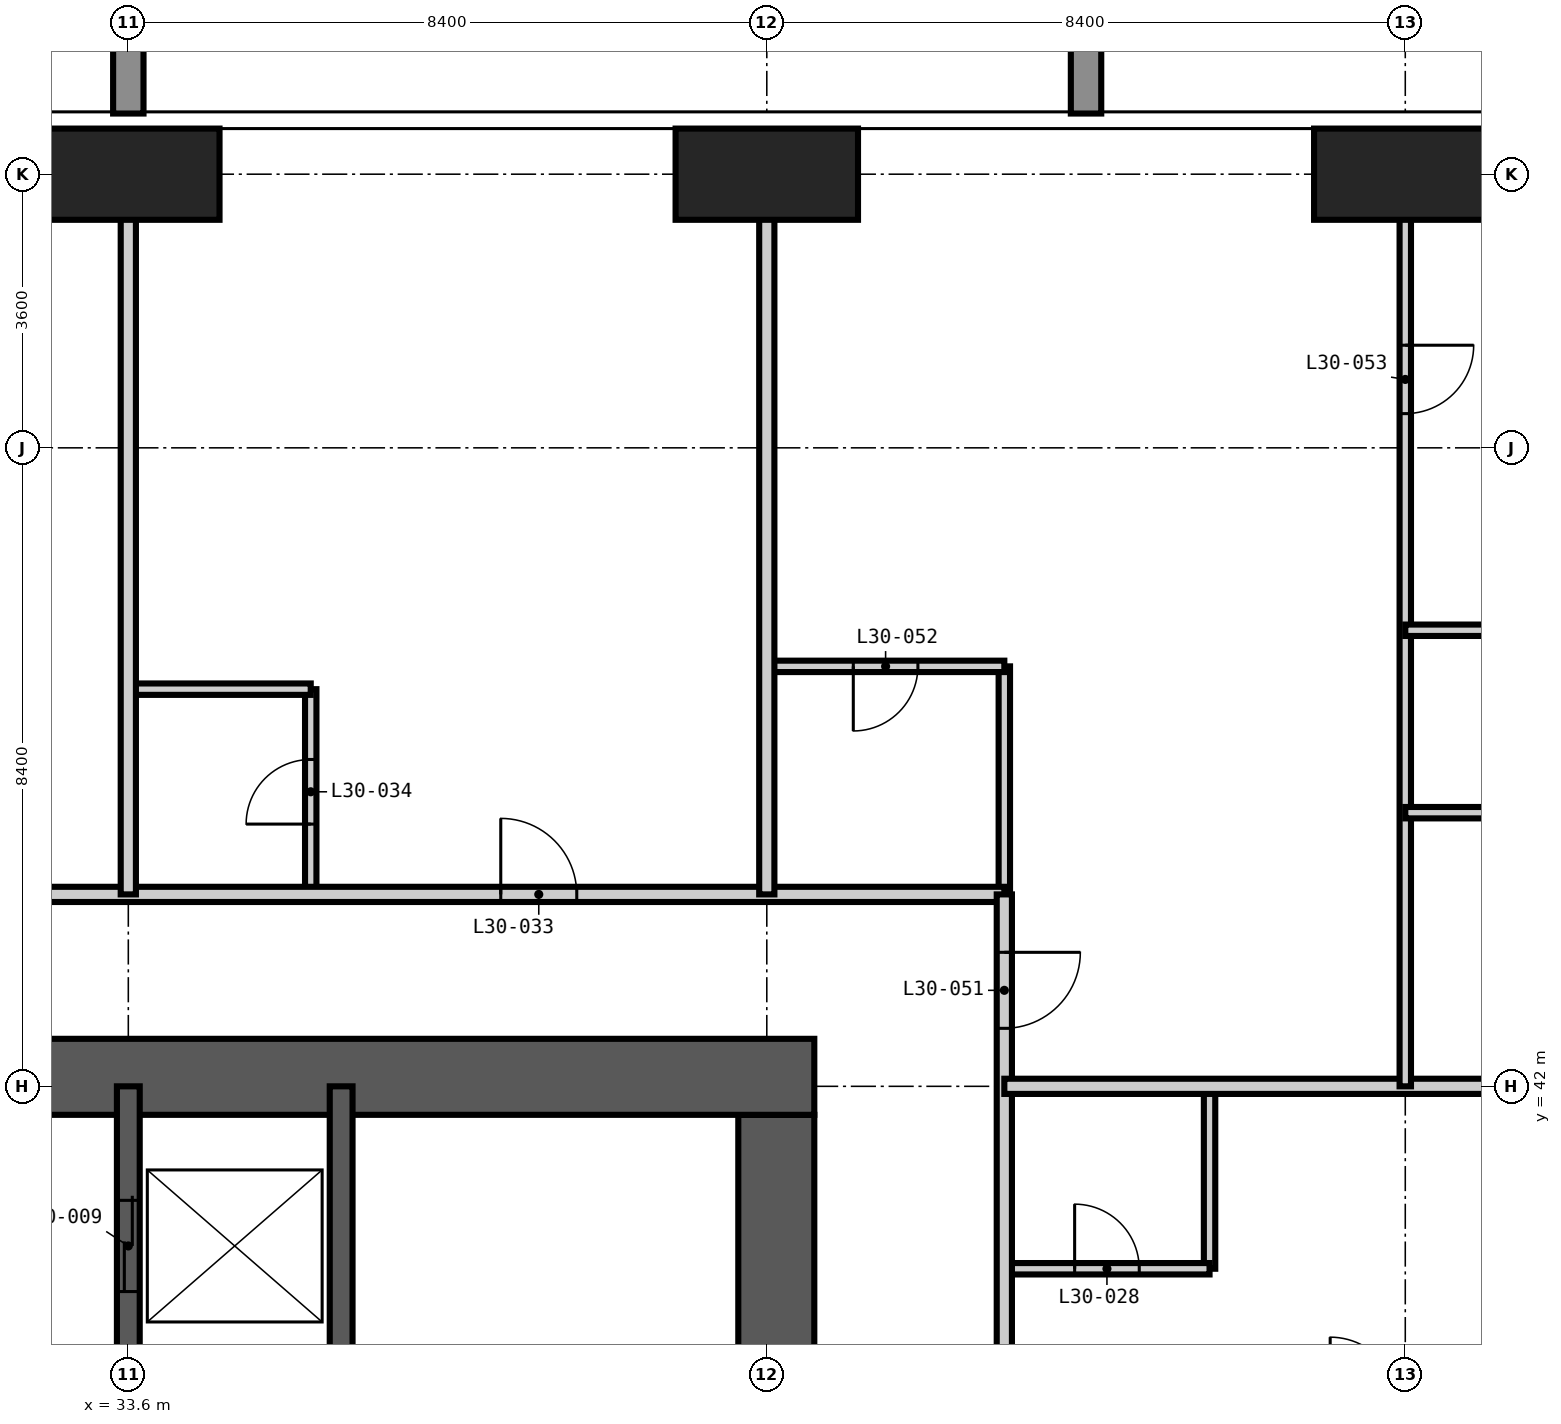
"""IFC4 building model, lengths in metres.
Left out: names, types, materials, properties, quantities, classifications, styles, units other than length and angle.
Written with IfcOpenShell. Run it as: python <this file> out.ifc"""

import sys

from ifc_helpers import new_model, si_unit, direction, frame, frame_2d, origin, origin_2d, place, context, subcontext, project, spatial, rectangle, extrude, element, fill, save


model = new_model("IFC4")
c1 = context("Model", 3, precision=1e-05, world=origin(), true_north=direction((0.0, 1.0)))
c2 = subcontext(c1, "Body", "Model", "MODEL_VIEW")
j1 = project(units=[si_unit("LENGTHUNIT", "METRE"), si_unit("PLANEANGLEUNIT", "RADIAN")], contexts=[c1])
p1 = place(None, origin())
s1 = spatial("IfcSite", under=j1, at=p1, CompositionType="ELEMENT")
p2 = place(p1, origin())
s2 = spatial("IfcBuilding", under=s1, at=p2, CompositionType="ELEMENT")
p3 = place(p2, frame((0.0, 0.0, 118.8)))
s3 = spatial("IfcBuildingStorey", under=s2, at=p3, CompositionType="ELEMENT", Elevation=118.8)
for number, where, z_axis, x_axis in (
    (1, (33.6, 54.0, -0.35), (0.0, 0.0, 1.0), (1.0, 0.0, 0.0)),
    (2, (42.0, 54.0, -0.35), (0.0, 0.0, 1.0), (1.0, 0.0, 0.0)),
    (3, (50.4, 54.0, -0.35), (0.0, 0.0, 1.0), (1.0, 0.0, 0.0)),
):
    element("IfcColumn", number, at=place(p3, frame(where, z_axis=z_axis, x_axis=x_axis)), inside=s3, PredefinedType="COLUMN", context=c2, shape_type="SweptSolid", body=[
        extrude(rectangle(XDim=2.4, YDim=1.2, at=origin_2d()), origin(), (0.0, 0.0, 1.0), 3.6),
    ])
p4 = place(p3, frame((42.125, 17.175, -0.35), z_axis=(0.0, 0.0, 1.0), x_axis=(0.0, 1.0, 0.0)))
e4 = element("IfcWall", 4, at=p4, inside=s3, PredefinedType="SHEAR", context=c2, shape_type="SweptSolid", body=[
    extrude(rectangle(XDim=24.45, YDim=1.0, at=frame_2d((12.225, 0.0))), origin(), (0.0, 0.0, 1.0), 3.6),
])
p5 = place(p4, frame((0.425, 0.0, 0.35)))
e5 = element("IfcOpeningElement", 5, at=p5, cuts=e4, PredefinedType="OPENING", context=c2, shape_type="SweptSolid", body=[
    extrude(rectangle(XDim=1.2, YDim=2.2, at=frame_2d((0.6, 1.1))), frame((0.0, 0.51, 0.0), z_axis=(0.0, -1.0, 0.0), x_axis=(1.0, 0.0, 0.0)), (0.0, 0.0, 1.0), 1.02),
])
p6 = place(p4, frame((11.325, 0.0, 0.35)))
e6 = element("IfcOpeningElement", 6, at=p6, cuts=e4, PredefinedType="OPENING", context=c2, shape_type="SweptSolid", body=[
    extrude(rectangle(XDim=1.8, YDim=2.2, at=frame_2d((0.9, 1.1))), frame((0.0, 0.51, 0.0), z_axis=(0.0, -1.0, 0.0), x_axis=(1.0, 0.0, 0.0)), (0.0, 0.0, 1.0), 1.02),
])
p7 = place(p4, frame((20.125, 0.0, 0.35)))
e7 = element("IfcOpeningElement", 7, at=p7, cuts=e4, PredefinedType="OPENING", context=c2, shape_type="SweptSolid", body=[
    extrude(rectangle(XDim=1.0, YDim=2.1, at=frame_2d((0.5, 1.05))), frame((0.0, 0.51, 0.0), z_axis=(0.0, -1.0, 0.0), x_axis=(1.0, 0.0, 0.0)), (0.0, 0.0, 1.0), 1.02),
])
p8 = place(p3, frame((42.625, 42.125, -0.35), z_axis=(0.0, 0.0, 1.0), x_axis=(-1.0, 0.0, 0.0)))
e8 = element("IfcWall", 8, at=p8, inside=s3, PredefinedType="SHEAR", context=c2, shape_type="SweptSolid", body=[
    extrude(rectangle(XDim=26.45, YDim=1.0, at=frame_2d((13.225, 0.0))), origin(), (0.0, 0.0, 1.0), 3.6),
])
p9 = place(p8, frame((21.125, 0.0, 0.35)))
e9 = element("IfcOpeningElement", 9, at=p9, cuts=e8, PredefinedType="OPENING", context=c2, shape_type="SweptSolid", body=[
    extrude(rectangle(XDim=1.0, YDim=2.1, at=frame_2d((0.5, 1.05))), frame((0.0, 0.51, 0.0), z_axis=(0.0, -1.0, 0.0), x_axis=(1.0, 0.0, 0.0)), (0.0, 0.0, 1.0), 1.02),
])
p10 = place(p8, frame((10.525, 0.0, 0.35)))
e10 = element("IfcOpeningElement", 10, at=p10, cuts=e8, PredefinedType="OPENING", context=c2, shape_type="SweptSolid", body=[
    extrude(rectangle(XDim=1.2, YDim=2.2, at=frame_2d((0.6, 1.1))), frame((0.0, 0.51, 0.0), z_axis=(0.0, -1.0, 0.0), x_axis=(1.0, 0.0, 0.0)), (0.0, 0.0, 1.0), 1.02),
])
p11 = place(p3, frame((33.6, 16.8, -0.35), z_axis=(0.0, 0.0, 1.0), x_axis=(0.0, 1.0, 0.0)))
e11 = element("IfcWall", 11, at=p11, inside=s3, PredefinedType="SHEAR", context=c2, shape_type="SweptSolid", body=[
    extrude(rectangle(XDim=25.2, YDim=0.3, at=frame_2d((12.6, 0.0))), origin(), (0.0, 0.0, 1.0), 3.6),
])
p12 = place(p11, frame((22.5, 0.0, 0.35)))
e12 = element("IfcOpeningElement", 12, at=p12, cuts=e11, PredefinedType="OPENING", context=c2, shape_type="SweptSolid", body=[
    extrude(rectangle(XDim=1.2, YDim=2.2, at=frame_2d((0.6, 1.1))), frame((0.0, 0.16, 0.0), z_axis=(0.0, -1.0, 0.0), x_axis=(1.0, 0.0, 0.0)), (0.0, 0.0, 1.0), 0.32),
])
p13 = place(p11, frame((18.3, 0.0, 0.35)))
e13 = element("IfcOpeningElement", 13, at=p13, cuts=e11, PredefinedType="OPENING", context=c2, shape_type="SweptSolid", body=[
    extrude(rectangle(XDim=1.2, YDim=2.2, at=frame_2d((0.6, 1.1))), frame((0.0, 0.16, 0.0), z_axis=(0.0, -1.0, 0.0), x_axis=(1.0, 0.0, 0.0)), (0.0, 0.0, 1.0), 0.32),
])
p14 = place(p3, frame((36.4, 33.6, -0.35), z_axis=(0.0, 0.0, 1.0), x_axis=(0.0, 1.0, 0.0)))
e14 = element("IfcWall", 14, at=p14, inside=s3, PredefinedType="SHEAR", context=c2, shape_type="SweptSolid", body=[
    extrude(rectangle(XDim=8.4, YDim=0.3, at=frame_2d((4.2, 0.0))), origin(), (0.0, 0.0, 1.0), 3.6),
])
p15 = place(p3, frame((36.0, 44.525, 0.0), z_axis=(0.0, 0.0, 1.0), x_axis=(0.0, 1.0, 0.0)))
e15 = element("IfcWall", 15, at=p15, inside=s3, PredefinedType="PARTITIONING", context=c2, shape_type="SweptSolid", body=[
    extrude(rectangle(XDim=2.7, YDim=0.15, at=frame_2d((1.35, 0.0))), origin(), (0.0, 0.0, 1.0), 3.25),
])
p16 = place(p15, frame((0.925, 0.0, 0.0)))
e16 = element("IfcOpeningElement", 16, at=p16, cuts=e15, PredefinedType="OPENING", context=c2, shape_type="SweptSolid", body=[
    extrude(rectangle(XDim=0.85, YDim=2.1, at=frame_2d((0.425, 1.05))), frame((0.0, 0.085, 0.0), z_axis=(0.0, -1.0, 0.0), x_axis=(1.0, 0.0, 0.0)), (0.0, 0.0, 1.0), 0.17),
])
p17 = place(p3, frame((45.125, 44.525, 0.0), z_axis=(0.0, 0.0, 1.0), x_axis=(0.0, 1.0, 0.0)))
e17 = element("IfcWall", 17, at=p17, inside=s3, PredefinedType="PARTITIONING", context=c2, shape_type="SweptSolid", body=[
    extrude(rectangle(XDim=3.0, YDim=0.15, at=frame_2d((1.5, 0.0))), origin(), (0.0, 0.0, 1.0), 3.25),
])
p18 = place(p3, frame((47.825, 39.6, 0.0), z_axis=(0.0, 0.0, 1.0), x_axis=(0.0, 1.0, 0.0)))
e18 = element("IfcWall", 18, at=p18, inside=s3, PredefinedType="PARTITIONING", context=c2, shape_type="SweptSolid", body=[
    extrude(rectangle(XDim=2.4, YDim=0.15, at=frame_2d((1.2, 0.0))), origin(), (0.0, 0.0, 1.0), 3.25),
])
p19 = place(p3, frame((45.125, 39.6, 0.0), z_axis=(0.0, 0.0, 1.0), x_axis=(1.0, 0.0, 0.0)))
e19 = element("IfcWall", 19, at=p19, inside=s3, PredefinedType="PARTITIONING", context=c2, shape_type="SweptSolid", body=[
    extrude(rectangle(XDim=2.7, YDim=0.15, at=frame_2d((1.35, 0.0))), origin(), (0.0, 0.0, 1.0), 3.25),
])
p20 = place(p19, frame((0.925, 0.0, 0.0)))
e20 = element("IfcOpeningElement", 20, at=p20, cuts=e19, PredefinedType="OPENING", context=c2, shape_type="SweptSolid", body=[
    extrude(rectangle(XDim=0.85, YDim=2.1, at=frame_2d((0.425, 1.05))), frame((0.0, 0.085, 0.0), z_axis=(0.0, -1.0, 0.0), x_axis=(1.0, 0.0, 0.0)), (0.0, 0.0, 1.0), 0.17),
])
p21 = place(p3, frame((33.6, 47.225, 0.0), z_axis=(0.0, 0.0, 1.0), x_axis=(1.0, 0.0, 0.0)))
e21 = element("IfcWall", 21, at=p21, inside=s3, PredefinedType="PARTITIONING", context=c2, shape_type="SweptSolid", body=[
    extrude(rectangle(XDim=2.4, YDim=0.15, at=frame_2d((1.2, 0.0))), origin(), (0.0, 0.0, 1.0), 3.25),
])
p22 = place(p3, frame((42.0, 47.525, 0.0), z_axis=(0.0, 0.0, 1.0), x_axis=(1.0, 0.0, 0.0)))
e22 = element("IfcWall", 22, at=p22, inside=s3, PredefinedType="PARTITIONING", context=c2, shape_type="SweptSolid", body=[
    extrude(rectangle(XDim=3.125, YDim=0.15, at=frame_2d((1.562, 0.0))), origin(), (0.0, 0.0, 1.0), 3.25),
])
p23 = place(p22, frame((1.138, 0.0, 0.0)))
e23 = element("IfcOpeningElement", 23, at=p23, cuts=e22, PredefinedType="OPENING", context=c2, shape_type="SweptSolid", body=[
    extrude(rectangle(XDim=0.85, YDim=2.1, at=frame_2d((0.425, 1.05))), frame((0.0, 0.085, 0.0), z_axis=(0.0, -1.0, 0.0), x_axis=(1.0, 0.0, 0.0)), (0.0, 0.0, 1.0), 0.17),
])
p24 = place(p3, frame((12.6, 44.525, 0.0), z_axis=(0.0, 0.0, 1.0), x_axis=(1.0, 0.0, 0.0)))
e24 = element("IfcWall", 24, at=p24, inside=s3, PredefinedType="PARTITIONING", context=c2, shape_type="SweptSolid", body=[
    extrude(rectangle(XDim=32.525, YDim=0.2, at=frame_2d((16.262, 0.0))), origin(), (0.0, 0.0, 1.0), 3.25),
])
p25 = place(p24, frame((9.1, 0.0, 0.0)))
e25 = element("IfcOpeningElement", 25, at=p25, cuts=e24, PredefinedType="OPENING", context=c2, shape_type="SweptSolid", body=[
    extrude(rectangle(XDim=1.0, YDim=2.2, at=frame_2d((0.5, 1.1))), frame((0.0, 0.11, 0.0), z_axis=(0.0, -1.0, 0.0), x_axis=(1.0, 0.0, 0.0)), (0.0, 0.0, 1.0), 0.22),
])
p26 = place(p24, frame((17.5, 0.0, 0.0)))
e26 = element("IfcOpeningElement", 26, at=p26, cuts=e24, PredefinedType="OPENING", context=c2, shape_type="SweptSolid", body=[
    extrude(rectangle(XDim=1.0, YDim=2.2, at=frame_2d((0.5, 1.1))), frame((0.0, 0.11, 0.0), z_axis=(0.0, -1.0, 0.0), x_axis=(1.0, 0.0, 0.0)), (0.0, 0.0, 1.0), 0.22),
])
p27 = place(p24, frame((25.9, 0.0, 0.0)))
e27 = element("IfcOpeningElement", 27, at=p27, cuts=e24, PredefinedType="OPENING", context=c2, shape_type="SweptSolid", body=[
    extrude(rectangle(XDim=1.0, YDim=2.2, at=frame_2d((0.5, 1.1))), frame((0.0, 0.11, 0.0), z_axis=(0.0, -1.0, 0.0), x_axis=(1.0, 0.0, 0.0)), (0.0, 0.0, 1.0), 0.22),
])
p28 = place(p3, frame((45.125, 44.525, 0.0), z_axis=(0.0, 0.0, 1.0), x_axis=(0.0, -1.0, 0.0)))
e28 = element("IfcWall", 28, at=p28, inside=s3, PredefinedType="PARTITIONING", context=c2, shape_type="SweptSolid", body=[
    extrude(rectangle(XDim=31.45, YDim=0.2, at=frame_2d((15.725, 0.0))), origin(), (0.0, 0.0, 1.0), 3.25),
])
p29 = place(p28, frame((24.225, 0.0, 0.0)))
e29 = element("IfcOpeningElement", 29, at=p29, cuts=e28, PredefinedType="OPENING", context=c2, shape_type="SweptSolid", body=[
    extrude(rectangle(XDim=1.0, YDim=2.2, at=frame_2d((0.5, 1.1))), frame((0.0, 0.11, 0.0), z_axis=(0.0, -1.0, 0.0), x_axis=(1.0, 0.0, 0.0)), (0.0, 0.0, 1.0), 0.22),
])
p30 = place(p28, frame((15.825, 0.0, 0.0)))
e30 = element("IfcOpeningElement", 30, at=p30, cuts=e28, PredefinedType="OPENING", context=c2, shape_type="SweptSolid", body=[
    extrude(rectangle(XDim=1.0, YDim=2.2, at=frame_2d((0.5, 1.1))), frame((0.0, 0.11, 0.0), z_axis=(0.0, -1.0, 0.0), x_axis=(1.0, 0.0, 0.0)), (0.0, 0.0, 1.0), 0.22),
])
p31 = place(p28, frame((7.425, 0.0, 0.0)))
e31 = element("IfcOpeningElement", 31, at=p31, cuts=e28, PredefinedType="OPENING", context=c2, shape_type="SweptSolid", body=[
    extrude(rectangle(XDim=1.0, YDim=2.2, at=frame_2d((0.5, 1.1))), frame((0.0, 0.11, 0.0), z_axis=(0.0, -1.0, 0.0), x_axis=(1.0, 0.0, 0.0)), (0.0, 0.0, 1.0), 0.22),
])
p32 = place(p28, frame((29.087, 0.0, 0.0)))
e32 = element("IfcOpeningElement", 32, at=p32, cuts=e28, PredefinedType="OPENING", context=c2, shape_type="SweptSolid", body=[
    extrude(rectangle(XDim=1.0, YDim=2.2, at=frame_2d((0.5, 1.1))), frame((0.0, 0.11, 0.0), z_axis=(0.0, -1.0, 0.0), x_axis=(1.0, 0.0, 0.0)), (0.0, 0.0, 1.0), 0.22),
])
p33 = place(p28, frame((0.762, 0.0, 0.0)))
e33 = element("IfcOpeningElement", 33, at=p33, cuts=e28, PredefinedType="OPENING", context=c2, shape_type="SweptSolid", body=[
    extrude(rectangle(XDim=1.0, YDim=2.2, at=frame_2d((0.5, 1.1))), frame((0.0, 0.11, 0.0), z_axis=(0.0, -1.0, 0.0), x_axis=(1.0, 0.0, 0.0)), (0.0, 0.0, 1.0), 0.22),
])
for number, where, z_axis, x_axis in (
    (34, (33.6, 44.525, 0.0), (0.0, 0.0, 1.0), (0.0, 1.0, 0.0)),
    (35, (42.0, 44.525, 0.0), (0.0, 0.0, 1.0), (0.0, 1.0, 0.0)),
):
    element("IfcWall", number, at=place(p3, frame(where, z_axis=z_axis, x_axis=x_axis)), inside=s3, PredefinedType="PARTITIONING", context=c2, shape_type="SweptSolid", body=[
        extrude(rectangle(XDim=10.093, YDim=0.2, at=frame_2d((5.046, 0.0))), origin(), (0.0, 0.0, 1.0), 3.25),
    ])
p34 = place(p3, frame((45.125, 42.0, 0.0), z_axis=(0.0, 0.0, 1.0), x_axis=(1.0, 0.0, 0.0)))
e36 = element("IfcWall", 36, at=p34, inside=s3, PredefinedType="PARTITIONING", context=c2, shape_type="SweptSolid", body=[
    extrude(rectangle(XDim=9.493, YDim=0.2, at=frame_2d((4.747, 0.0))), origin(), (0.0, 0.0, 1.0), 3.25),
])
p35 = place(p3, frame((50.4, 42.0, 0.0), z_axis=(0.0, 0.0, 1.0), x_axis=(0.0, 1.0, 0.0)))
e37 = element("IfcWall", 37, at=p35, inside=s3, PredefinedType="PARTITIONING", context=c2, shape_type="SweptSolid", body=[
    extrude(rectangle(XDim=12.618, YDim=0.15, at=frame_2d((6.309, 0.0))), origin(), (0.0, 0.0, 1.0), 3.25),
])
p36 = place(p35, frame((8.85, 0.0, 0.0)))
e38 = element("IfcOpeningElement", 38, at=p36, cuts=e37, PredefinedType="OPENING", context=c2, shape_type="SweptSolid", body=[
    extrude(rectangle(XDim=0.9, YDim=2.1, at=frame_2d((0.45, 1.05))), frame((0.0, 0.085, 0.0), z_axis=(0.0, -1.0, 0.0), x_axis=(1.0, 0.0, 0.0)), (0.0, 0.0, 1.0), 0.17),
])
p37 = place(p3, frame((50.4, 45.6, 0.0), z_axis=(0.0, 0.0, 1.0), x_axis=(1.0, 0.0, 0.0)))
e39 = element("IfcWall", 39, at=p37, inside=s3, PredefinedType="PARTITIONING", context=c2, shape_type="SweptSolid", body=[
    extrude(rectangle(XDim=3.0, YDim=0.15, at=frame_2d((1.5, 0.0))), origin(), (0.0, 0.0, 1.0), 3.25),
])
p38 = place(p3, frame((50.4, 48.0, 0.0), z_axis=(0.0, 0.0, 1.0), x_axis=(1.0, 0.0, 0.0)))
e40 = element("IfcWall", 40, at=p38, inside=s3, PredefinedType="PARTITIONING", context=c2, shape_type="SweptSolid", body=[
    extrude(rectangle(XDim=3.0, YDim=0.15, at=frame_2d((1.5, 0.0))), origin(), (0.0, 0.0, 1.0), 3.25),
])
p39 = place(p38, frame((1.05, 0.0, 0.0)))
e41 = element("IfcOpeningElement", 41, at=p39, cuts=e40, PredefinedType="OPENING", context=c2, shape_type="SweptSolid", body=[
    extrude(rectangle(XDim=0.9, YDim=2.1, at=frame_2d((0.45, 1.05))), frame((0.0, 0.085, 0.0), z_axis=(0.0, -1.0, 0.0), x_axis=(1.0, 0.0, 0.0)), (0.0, 0.0, 1.0), 0.17),
])
p40 = place(p12, origin())
e42 = element("IfcDoor", 42, at=p40, inside=s3, OperationType="DOUBLE_DOOR_SLIDING", PredefinedType="DOOR", context=c2, shape_type="SweptSolid", body=[
    extrude(rectangle(XDim=1.2, YDim=2.2, at=frame_2d((0.6, 1.1))), frame((0.0, 0.025, 0.0), z_axis=(0.0, -1.0, 0.0), x_axis=(1.0, 0.0, 0.0)), (0.0, 0.0, 1.0), 0.05),
])
fill(e12, e42)
p41 = place(p20, origin())
e43 = element("IfcDoor", 43, at=p41, inside=s3, OperationType="SINGLE_SWING_LEFT", PredefinedType="DOOR", context=c2, shape_type="SweptSolid", body=[
    extrude(rectangle(XDim=0.85, YDim=2.1, at=frame_2d((0.425, 1.05))), frame((0.0, 0.025, 0.0), z_axis=(0.0, -1.0, 0.0), x_axis=(1.0, 0.0, 0.0)), (0.0, 0.0, 1.0), 0.05),
])
fill(e20, e43)
p42 = place(p27, origin())
e44 = element("IfcDoor", 44, at=p42, inside=s3, OperationType="SINGLE_SWING_LEFT", PredefinedType="DOOR", context=c2, shape_type="SweptSolid", body=[
    extrude(rectangle(XDim=1.0, YDim=2.2, at=frame_2d((0.5, 1.1))), frame((0.0, 0.025, 0.0), z_axis=(0.0, -1.0, 0.0), x_axis=(1.0, 0.0, 0.0)), (0.0, 0.0, 1.0), 0.05),
])
fill(e27, e44)
p43 = place(p16, origin())
e45 = element("IfcDoor", 45, at=p43, inside=s3, OperationType="SINGLE_SWING_LEFT", PredefinedType="DOOR", context=c2, shape_type="SweptSolid", body=[
    extrude(rectangle(XDim=0.85, YDim=2.1, at=frame_2d((0.425, 1.05))), frame((0.0, 0.025, 0.0), z_axis=(0.0, -1.0, 0.0), x_axis=(1.0, 0.0, 0.0)), (0.0, 0.0, 1.0), 0.05),
])
fill(e16, e45)
p44 = place(p33, origin())
e46 = element("IfcDoor", 46, at=p44, inside=s3, OperationType="SINGLE_SWING_LEFT", PredefinedType="DOOR", context=c2, shape_type="SweptSolid", body=[
    extrude(rectangle(XDim=1.0, YDim=2.2, at=frame_2d((0.5, 1.1))), frame((0.0, 0.025, 0.0), z_axis=(0.0, -1.0, 0.0), x_axis=(1.0, 0.0, 0.0)), (0.0, 0.0, 1.0), 0.05),
])
fill(e33, e46)
p45 = place(p23, frame((0.85, 0.0, 0.0), z_axis=(0.0, 0.0, 1.0), x_axis=(-1.0, 0.0, 0.0)))
e47 = element("IfcDoor", 47, at=p45, inside=s3, OperationType="SINGLE_SWING_RIGHT", PredefinedType="DOOR", context=c2, shape_type="SweptSolid", body=[
    extrude(rectangle(XDim=0.85, YDim=2.1, at=frame_2d((0.425, 1.05))), frame((0.0, 0.025, 0.0), z_axis=(0.0, -1.0, 0.0), x_axis=(1.0, 0.0, 0.0)), (0.0, 0.0, 1.0), 0.05),
])
fill(e23, e47)
p46 = place(p36, frame((0.9, 0.0, 0.0), z_axis=(0.0, 0.0, 1.0), x_axis=(-1.0, 0.0, 0.0)))
e48 = element("IfcDoor", 48, at=p46, inside=s3, OperationType="SINGLE_SWING_LEFT", PredefinedType="DOOR", context=c2, shape_type="SweptSolid", body=[
    extrude(rectangle(XDim=0.9, YDim=2.1, at=frame_2d((0.45, 1.05))), frame((0.0, 0.025, 0.0), z_axis=(0.0, -1.0, 0.0), x_axis=(1.0, 0.0, 0.0)), (0.0, 0.0, 1.0), 0.05),
])
fill(e38, e48)
save(model, sys.argv[1])
